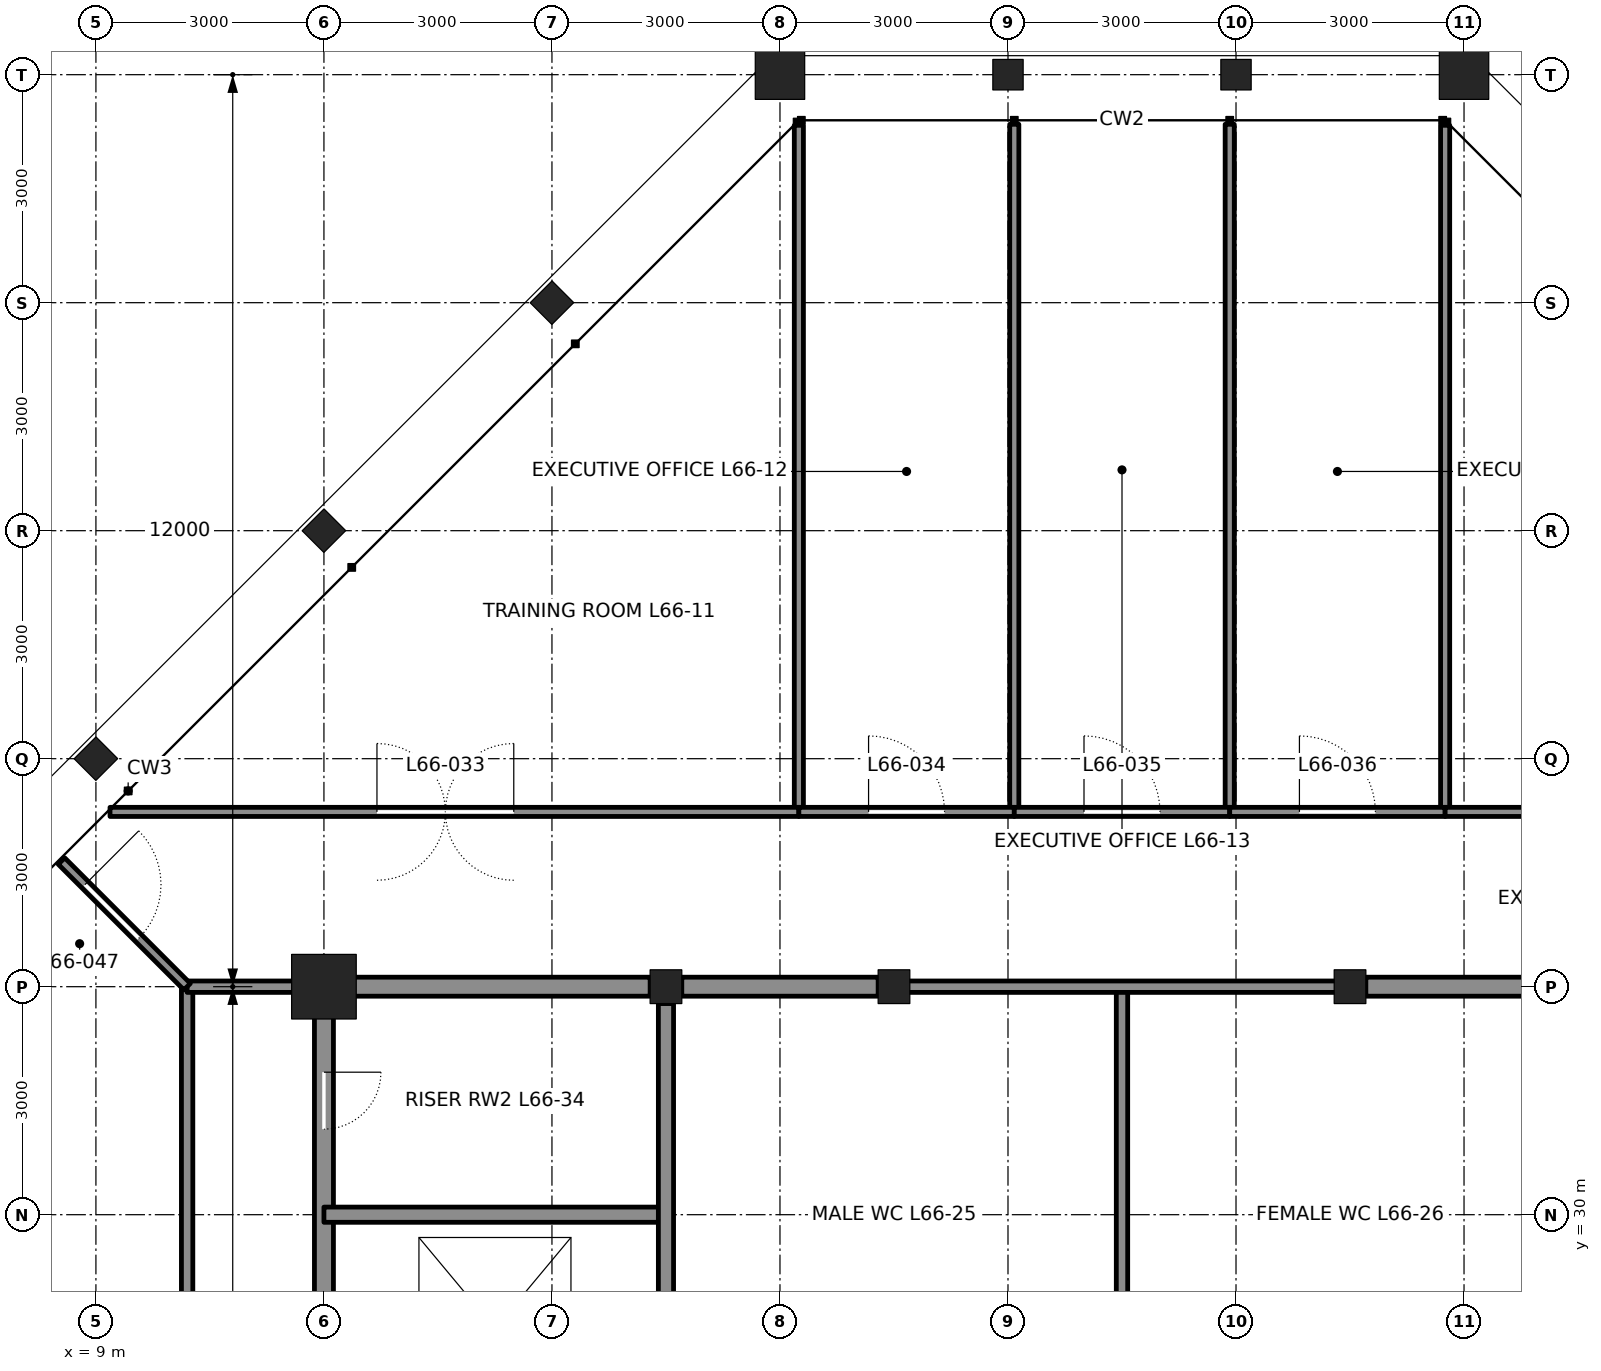
"""IFC4 building model, lengths in metres.
Left out: names, types, materials, properties, quantities, classifications, styles, units other than length and angle.
Written with IfcOpenShell. Run it as: python <this file> out.ifc"""

import sys

from ifc_helpers import new_model, si_unit, direction, frame, frame_2d, origin, origin_2d, place, context, subcontext, project, spatial, rectangle, hollow_rectangle, i_section, extrude, element, fill, save


model = new_model("IFC4")
c1 = context("Model", 3, precision=1e-05, world=origin(), true_north=direction((0.0, 1.0)))
c2 = subcontext(c1, "Body", "Model", "MODEL_VIEW")
j1 = project(units=[si_unit("LENGTHUNIT", "METRE"), si_unit("PLANEANGLEUNIT", "RADIAN")], contexts=[c1])
p1 = place(None, origin())
s1 = spatial("IfcSite", under=j1, at=p1, CompositionType="ELEMENT")
p2 = place(p1, origin())
s2 = spatial("IfcBuilding", under=s1, at=p2, CompositionType="ELEMENT")
p3 = place(p2, frame((0.0, 0.0, 295.8)))
s3 = spatial("IfcBuildingStorey", under=s2, at=p3, CompositionType="ELEMENT", Elevation=295.8)
p4 = place(p3, frame((27.0, 45.0, 0.0), z_axis=(0.0, 0.0, 1.0), x_axis=(0.0, 1.0, 0.0)))
e1 = element("IfcColumn", 1, at=p4, inside=s3, PredefinedType="COLUMN", context=c2, shape_type="SweptSolid", body=[
    extrude(hollow_rectangle(XDim=0.65, YDim=0.65, WallThickness=0.065, at=origin_2d()), origin(), (0.0, 0.0, 1.0), 4.2),
])
for number, where, z_axis, x_axis in (
    (2, (24.0, 45.0, 0.0), (0.0, 0.0, 1.0), (0.0, 1.0, 0.0)),
    (3, (21.0, 45.0, 0.0), (0.0, 0.0, 1.0), (0.0, 1.0, 0.0)),
):
    element("IfcColumn", number, at=place(p3, frame(where, z_axis=z_axis, x_axis=x_axis)), inside=s3, PredefinedType="COLUMN", context=c2, shape_type="SweptSolid", body=[
        extrude(i_section(OverallWidth=0.401, OverallDepth=0.399, WebThickness=0.025, FlangeThickness=0.04, at=origin_2d()), origin(), (0.0, 0.0, 1.0), 4.2),
    ])
p5 = place(p3, frame((18.0, 45.0, 0.0), z_axis=(0.0, 0.0, 1.0), x_axis=(0.0, 1.0, 0.0)))
e4 = element("IfcColumn", 4, at=p5, inside=s3, PredefinedType="COLUMN", context=c2, shape_type="SweptSolid", body=[
    extrude(hollow_rectangle(XDim=0.65, YDim=0.65, WallThickness=0.065, at=origin_2d()), origin(), (0.0, 0.0, 1.0), 4.2),
])
for number, where, z_axis, x_axis in (
    (5, (15.0, 42.0, 0.0), (0.0, 0.0, 1.0), (-0.707, 0.707, 0.0)),
    (6, (12.0, 39.0, 0.0), (0.0, 0.0, 1.0), (-0.707, 0.707, 0.0)),
    (7, (9.0, 36.0, 0.0), (0.0, 0.0, 1.0), (-0.707, 0.707, 0.0)),
):
    element("IfcColumn", number, at=place(p3, frame(where, z_axis=z_axis, x_axis=x_axis)), inside=s3, PredefinedType="COLUMN", context=c2, shape_type="SweptSolid", body=[
        extrude(i_section(OverallWidth=0.404, OverallDepth=0.406, WebThickness=0.027, FlangeThickness=0.044, at=origin_2d()), origin(), (0.0, 0.0, 1.0), 4.2),
    ])
p6 = place(p3, frame((12.0, 33.0, 0.0), z_axis=(0.0, 0.0, 1.0), x_axis=(1.0, 0.0, 0.0)))
e8 = element("IfcColumn", 8, at=p6, inside=s3, PredefinedType="COLUMN", context=c2, shape_type="SweptSolid", body=[
    extrude(hollow_rectangle(XDim=0.85, YDim=0.85, WallThickness=0.085, at=origin_2d()), origin(), (0.0, 0.0, 1.0), 4.2),
])
for number, where, z_axis, x_axis in (
    (9, (16.5, 33.0, 0.0), (0.0, 0.0, 1.0), (1.0, 0.0, 0.0)),
    (10, (19.5, 33.0, 0.0), (0.0, 0.0, 1.0), (1.0, 0.0, 0.0)),
    (11, (25.5, 33.0, 0.0), (0.0, 0.0, 1.0), (1.0, 0.0, 0.0)),
):
    element("IfcColumn", number, at=place(p3, frame(where, z_axis=z_axis, x_axis=x_axis)), inside=s3, PredefinedType="COLUMN", context=c2, shape_type="SweptSolid", body=[
        extrude(i_section(OverallWidth=0.417, OverallDepth=0.445, WebThickness=0.039, FlangeThickness=0.063, at=origin_2d()), origin(), (0.0, 0.0, 1.0), 4.2),
    ])
p7 = place(p3, frame((12.0, 24.222, 0.0), z_axis=(0.0, 0.0, 1.0), x_axis=(0.0, 1.0, 0.0)))
e12 = element("IfcWall", 12, at=p7, inside=s3, PredefinedType="SOLIDWALL", context=c2, shape_type="SweptSolid", body=[
    extrude(rectangle(XDim=8.528, YDim=0.25, at=frame_2d((4.264, 0.0))), origin(), (0.0, 0.0, 1.0), 3.113),
])
p8 = place(p7, frame((0.678, 0.0, 0.0)))
e13 = element("IfcOpeningElement", 13, at=p8, cuts=e12, PredefinedType="OPENING", context=c2, shape_type="SweptSolid", body=[
    extrude(rectangle(XDim=1.2, YDim=2.1, at=frame_2d((0.6, 1.05))), frame((0.0, 0.135, 0.0), z_axis=(0.0, -1.0, 0.0), x_axis=(1.0, 0.0, 0.0)), (0.0, 0.0, 1.0), 0.27),
])
p9 = place(p7, frame((6.903, 0.0, 0.0)))
e14 = element("IfcOpeningElement", 14, at=p9, cuts=e12, PredefinedType="OPENING", context=c2, shape_type="SweptSolid", body=[
    extrude(rectangle(XDim=0.75, YDim=2.1, at=frame_2d((0.375, 1.05))), frame((0.0, 0.135, 0.0), z_axis=(0.0, -1.0, 0.0), x_axis=(1.0, 0.0, 0.0)), (0.0, 0.0, 1.0), 0.27),
])
p10 = place(p3, frame((12.0, 30.0, 0.0), z_axis=(0.0, 0.0, 1.0), x_axis=(1.0, 0.0, 0.0)))
e15 = element("IfcWall", 15, at=p10, inside=s3, PredefinedType="SOLIDWALL", context=c2, shape_type="SweptSolid", body=[
    extrude(rectangle(XDim=4.5, YDim=0.2, at=frame_2d((2.25, 0.0))), origin(), (0.0, 0.0, 1.0), 4.04),
])
p11 = place(p3, frame((12.25, 33.0, 0.0), z_axis=(0.0, 0.0, 1.0), x_axis=(1.0, 0.0, 0.0)))
e16 = element("IfcWall", 16, at=p11, inside=s3, PredefinedType="SOLIDWALL", context=c2, shape_type="SweptSolid", body=[
    extrude(rectangle(XDim=4.042, YDim=0.25, at=frame_2d((2.021, 0.0))), origin(), (0.0, 0.0, 1.0), 3.181),
])
for number, where, z_axis, x_axis in (
    (17, (16.708, 33.0, 0.0), (0.0, 0.0, 1.0), (1.0, 0.0, 0.0)),
    (18, (25.708, 33.0, 0.0), (0.0, 0.0, 1.0), (1.0, 0.0, 0.0)),
):
    element("IfcWall", number, at=place(p3, frame(where, z_axis=z_axis, x_axis=x_axis)), inside=s3, PredefinedType="SOLIDWALL", context=c2, shape_type="SweptSolid", body=[
        extrude(rectangle(XDim=2.583, YDim=0.25, at=frame_2d((1.292, 0.0))), origin(), (0.0, 0.0, 1.0), 3.181),
    ])
p12 = place(p3, frame((16.5, 24.222, 0.0), z_axis=(0.0, 0.0, 1.0), x_axis=(0.0, 1.0, 0.0)))
e19 = element("IfcWall", 19, at=p12, inside=s3, PredefinedType="SOLIDWALL", context=c2, shape_type="SweptSolid", body=[
    extrude(rectangle(XDim=8.555, YDim=0.2, at=frame_2d((4.278, 0.0))), origin(), (0.0, 0.0, 1.0), 3.113),
])
p13 = place(p3, frame((22.5, 27.0, 0.0), z_axis=(0.0, 0.0, 1.0), x_axis=(0.0, 1.0, 0.0)))
e20 = element("IfcWall", 20, at=p13, inside=s3, PredefinedType="PARTITIONING", context=c2, shape_type="SweptSolid", body=[
    extrude(rectangle(XDim=6.0, YDim=0.15, at=frame_2d((3.0, 0.0))), origin(), (0.0, 0.0, 1.0), 4.04),
])
p14 = place(p3, frame((19.5, 33.0, 0.0), z_axis=(0.0, 0.0, 1.0), x_axis=(1.0, 0.0, 0.0)))
e21 = element("IfcWall", 21, at=p14, inside=s3, PredefinedType="PARTITIONING", context=c2, shape_type="SweptSolid", body=[
    extrude(rectangle(XDim=6.0, YDim=0.15, at=frame_2d((3.0, 0.0))), origin(), (0.0, 0.0, 1.0), 3.181),
])
p15 = place(p3, frame((18.249, 44.334, 0.0), z_axis=(0.0, 0.0, 1.0), x_axis=(0.0, -1.0, 0.0)))
e22 = element("IfcWall", 22, at=p15, inside=s3, PredefinedType="PARTITIONING", context=c2, shape_type="SweptSolid", body=[
    extrude(rectangle(XDim=9.034, YDim=0.12, at=frame_2d((4.517, 0.0))), origin(), (0.0, 0.0, 1.0), 4.04),
])
for number, where, z_axis, x_axis in (
    (23, (21.083, 44.347, 0.0), (0.0, 0.0, 1.0), (0.0, -1.0, 0.0)),
    (24, (23.917, 44.347, 0.0), (0.0, 0.0, 1.0), (0.0, -1.0, 0.0)),
):
    element("IfcWall", number, at=place(p3, frame(where, z_axis=z_axis, x_axis=x_axis)), inside=s3, PredefinedType="PARTITIONING", context=c2, shape_type="SweptSolid", body=[
        extrude(rectangle(XDim=9.047, YDim=0.12, at=frame_2d((4.524, 0.0))), origin(), (0.0, 0.0, 1.0), 3.278),
    ])
p16 = place(p3, frame((26.751, 44.334, 0.0), z_axis=(0.0, 0.0, 1.0), x_axis=(0.0, -1.0, 0.0)))
e25 = element("IfcWall", 25, at=p16, inside=s3, PredefinedType="PARTITIONING", context=c2, shape_type="SweptSolid", body=[
    extrude(rectangle(XDim=9.034, YDim=0.12, at=frame_2d((4.517, 0.0))), origin(), (0.0, 0.0, 1.0), 4.04),
])
p17 = place(p3, frame((9.186, 35.3, 0.0), z_axis=(0.0, 0.0, 1.0), x_axis=(1.0, 0.0, 0.0)))
e26 = element("IfcWall", 26, at=p17, inside=s3, PredefinedType="PARTITIONING", context=c2, shape_type="SweptSolid", body=[
    extrude(rectangle(XDim=9.063, YDim=0.12, at=frame_2d((4.531, 0.0))), origin(), (0.0, 0.0, 1.0), 4.04),
])
p18 = place(p17, frame((3.512, 0.0, 0.0)))
e27 = element("IfcOpeningElement", 27, at=p18, cuts=e26, PredefinedType="OPENING", context=c2, shape_type="SweptSolid", body=[
    extrude(rectangle(XDim=1.8, YDim=2.4, at=frame_2d((0.9, 1.2))), frame((0.0, 0.07, 0.0), z_axis=(0.0, -1.0, 0.0), x_axis=(1.0, 0.0, 0.0)), (0.0, 0.0, 1.0), 0.14),
])
p19 = place(p3, frame((18.249, 35.3, 0.0), z_axis=(0.0, 0.0, 1.0), x_axis=(1.0, 0.0, 0.0)))
e28 = element("IfcWall", 28, at=p19, inside=s3, PredefinedType="PARTITIONING", context=c2, shape_type="SweptSolid", body=[
    extrude(rectangle(XDim=2.834, YDim=0.12, at=frame_2d((1.417, 0.0))), origin(), (0.0, 0.0, 1.0), 4.04),
])
p20 = place(p19, frame((0.917, 0.0, 0.0)))
e29 = element("IfcOpeningElement", 29, at=p20, cuts=e28, PredefinedType="OPENING", context=c2, shape_type="SweptSolid", body=[
    extrude(rectangle(XDim=1.0, YDim=2.4, at=frame_2d((0.5, 1.2))), frame((0.0, 0.07, 0.0), z_axis=(0.0, -1.0, 0.0), x_axis=(1.0, 0.0, 0.0)), (0.0, 0.0, 1.0), 0.14),
])
p21 = place(p3, frame((21.083, 35.3, 0.0), z_axis=(0.0, 0.0, 1.0), x_axis=(1.0, 0.0, 0.0)))
e30 = element("IfcWall", 30, at=p21, inside=s3, PredefinedType="PARTITIONING", context=c2, shape_type="SweptSolid", body=[
    extrude(rectangle(XDim=2.834, YDim=0.12, at=frame_2d((1.417, 0.0))), origin(), (0.0, 0.0, 1.0), 4.04),
])
p22 = place(p21, frame((0.917, 0.0, 0.0)))
e31 = element("IfcOpeningElement", 31, at=p22, cuts=e30, PredefinedType="OPENING", context=c2, shape_type="SweptSolid", body=[
    extrude(rectangle(XDim=1.0, YDim=2.4, at=frame_2d((0.5, 1.2))), frame((0.0, 0.07, 0.0), z_axis=(0.0, -1.0, 0.0), x_axis=(1.0, 0.0, 0.0)), (0.0, 0.0, 1.0), 0.14),
])
p23 = place(p3, frame((23.917, 35.3, 0.0), z_axis=(0.0, 0.0, 1.0), x_axis=(1.0, 0.0, 0.0)))
e32 = element("IfcWall", 32, at=p23, inside=s3, PredefinedType="PARTITIONING", context=c2, shape_type="SweptSolid", body=[
    extrude(rectangle(XDim=2.834, YDim=0.12, at=frame_2d((1.417, 0.0))), origin(), (0.0, 0.0, 1.0), 4.04),
])
p24 = place(p23, frame((0.917, 0.0, 0.0)))
e33 = element("IfcOpeningElement", 33, at=p24, cuts=e32, PredefinedType="OPENING", context=c2, shape_type="SweptSolid", body=[
    extrude(rectangle(XDim=1.0, YDim=2.4, at=frame_2d((0.5, 1.2))), frame((0.0, 0.07, 0.0), z_axis=(0.0, -1.0, 0.0), x_axis=(1.0, 0.0, 0.0)), (0.0, 0.0, 1.0), 0.14),
])
p25 = place(p3, frame((26.751, 35.3, 0.0), z_axis=(0.0, 0.0, 1.0), x_axis=(1.0, 0.0, 0.0)))
e34 = element("IfcWall", 34, at=p25, inside=s3, PredefinedType="PARTITIONING", context=c2, shape_type="SweptSolid", body=[
    extrude(rectangle(XDim=9.063, YDim=0.12, at=frame_2d((4.531, 0.0))), origin(), (0.0, 0.0, 1.0), 4.04),
])
p26 = place(p25, frame((3.512, 0.0, 0.0)))
e35 = element("IfcOpeningElement", 35, at=p26, cuts=e34, PredefinedType="OPENING", context=c2, shape_type="SweptSolid", body=[
    extrude(rectangle(XDim=1.8, YDim=2.4, at=frame_2d((0.9, 1.2))), frame((0.0, 0.07, 0.0), z_axis=(0.0, -1.0, 0.0), x_axis=(1.0, 0.0, 0.0)), (0.0, 0.0, 1.0), 0.14),
])
p27 = place(p3, frame((10.2, 8.686, 0.0), z_axis=(0.0, 0.0, 1.0), x_axis=(0.0, 1.0, 0.0)))
e36 = element("IfcWall", 36, at=p27, inside=s3, PredefinedType="PARTITIONING", context=c2, shape_type="SweptSolid", body=[
    extrude(rectangle(XDim=24.314, YDim=0.15, at=frame_2d((12.157, 0.0))), origin(), (0.0, 0.0, 1.0), 4.04),
])
p28 = place(p27, frame((11.5, 0.0, 0.0)))
e37 = element("IfcOpeningElement", 37, at=p28, cuts=e36, PredefinedType="OPENING", context=c2, shape_type="SweptSolid", body=[
    extrude(rectangle(XDim=1.0, YDim=2.4, at=frame_2d((0.5, 1.2))), frame((0.0, 0.085, 0.0), z_axis=(0.0, -1.0, 0.0), x_axis=(1.0, 0.0, 0.0)), (0.0, 0.0, 1.0), 0.17),
])
p29 = place(p3, frame((10.2, 33.0, 0.0), z_axis=(0.0, 0.0, 1.0), x_axis=(1.0, 0.0, 0.0)))
e38 = element("IfcWall", 38, at=p29, inside=s3, PredefinedType="PARTITIONING", context=c2, shape_type="SweptSolid", body=[
    extrude(rectangle(XDim=1.8, YDim=0.15, at=frame_2d((0.9, 0.0))), origin(), (0.0, 0.0, 1.0), 3.093),
])
p30 = place(p3, frame((10.2, 33.0, 0.0), z_axis=(0.0, 0.0, 1.0), x_axis=(-0.707106781187, 0.707106781187, 0.0)))
e39 = element("IfcWall", 39, at=p30, inside=s3, PredefinedType="PARTITIONING", context=c2, shape_type="SweptSolid", body=[
    extrude(rectangle(XDim=2.338, YDim=0.12, at=frame_2d((1.169, 0.0))), origin(), (0.0, 0.0, 1.0), 4.04),
])
p31 = place(p30, frame((0.9, 0.0, 0.0)))
e40 = element("IfcOpeningElement", 40, at=p31, cuts=e39, PredefinedType="OPENING", context=c2, shape_type="SweptSolid", body=[
    extrude(rectangle(XDim=1.0, YDim=2.4, at=frame_2d((0.5, 1.2))), frame((0.0, 0.07, 0.0), z_axis=(0.0, -1.0, 0.0), x_axis=(1.0, 0.0, 0.0)), (0.0, 0.0, 1.0), 0.14),
])
p32 = place(p9, frame((0.75, 0.0, 0.0), z_axis=(0.0, 0.0, 1.0), x_axis=(-1.0, 0.0, 0.0)))
e41 = element("IfcDoor", 41, at=p32, inside=s3, OperationType="SINGLE_SWING_LEFT", PredefinedType="DOOR", context=c2, shape_type="SweptSolid", body=[
    extrude(rectangle(XDim=0.75, YDim=2.1, at=frame_2d((0.375, 1.05))), frame((0.0, 0.025, 0.0), z_axis=(0.0, -1.0, 0.0), x_axis=(1.0, 0.0, 0.0)), (0.0, 0.0, 1.0), 0.05),
])
fill(e14, e41)
p33 = place(p18, origin())
e42 = element("IfcDoor", 42, at=p33, inside=s3, OperationType="DOUBLE_DOOR_DOUBLE_SWING", PredefinedType="DOOR", context=c2, shape_type="SweptSolid", body=[
    extrude(rectangle(XDim=1.8, YDim=2.4, at=frame_2d((0.9, 1.2))), frame((0.0, 0.025, 0.0), z_axis=(0.0, -1.0, 0.0), x_axis=(1.0, 0.0, 0.0)), (0.0, 0.0, 1.0), 0.05),
])
fill(e27, e42)
p34 = place(p20, origin())
e43 = element("IfcDoor", 43, at=p34, inside=s3, OperationType="SINGLE_SWING_LEFT", PredefinedType="DOOR", context=c2, shape_type="SweptSolid", body=[
    extrude(rectangle(XDim=1.0, YDim=2.4, at=frame_2d((0.5, 1.2))), frame((0.0, 0.025, 0.0), z_axis=(0.0, -1.0, 0.0), x_axis=(1.0, 0.0, 0.0)), (0.0, 0.0, 1.0), 0.05),
])
fill(e29, e43)
p35 = place(p22, origin())
e44 = element("IfcDoor", 44, at=p35, inside=s3, OperationType="SINGLE_SWING_LEFT", PredefinedType="DOOR", context=c2, shape_type="SweptSolid", body=[
    extrude(rectangle(XDim=1.0, YDim=2.4, at=frame_2d((0.5, 1.2))), frame((0.0, 0.025, 0.0), z_axis=(0.0, -1.0, 0.0), x_axis=(1.0, 0.0, 0.0)), (0.0, 0.0, 1.0), 0.05),
])
fill(e31, e44)
p36 = place(p24, origin())
e45 = element("IfcDoor", 45, at=p36, inside=s3, OperationType="SINGLE_SWING_LEFT", PredefinedType="DOOR", context=c2, shape_type="SweptSolid", body=[
    extrude(rectangle(XDim=1.0, YDim=2.4, at=frame_2d((0.5, 1.2))), frame((0.0, 0.025, 0.0), z_axis=(0.0, -1.0, 0.0), x_axis=(1.0, 0.0, 0.0)), (0.0, 0.0, 1.0), 0.05),
])
fill(e33, e45)
p37 = place(p31, frame((1.0, 0.0, 0.0), z_axis=(0.0, 0.0, 1.0), x_axis=(-1.0, 0.0, 0.0)))
e46 = element("IfcDoor", 46, at=p37, inside=s3, OperationType="SINGLE_SWING_LEFT", PredefinedType="DOOR", context=c2, shape_type="SweptSolid", body=[
    extrude(rectangle(XDim=1.0, YDim=2.4, at=frame_2d((0.5, 1.2))), frame((0.0, 0.025, 0.0), z_axis=(0.0, -1.0, 0.0), x_axis=(1.0, 0.0, 0.0)), (0.0, 0.0, 1.0), 0.05),
])
fill(e40, e46)
save(model, sys.argv[1])
